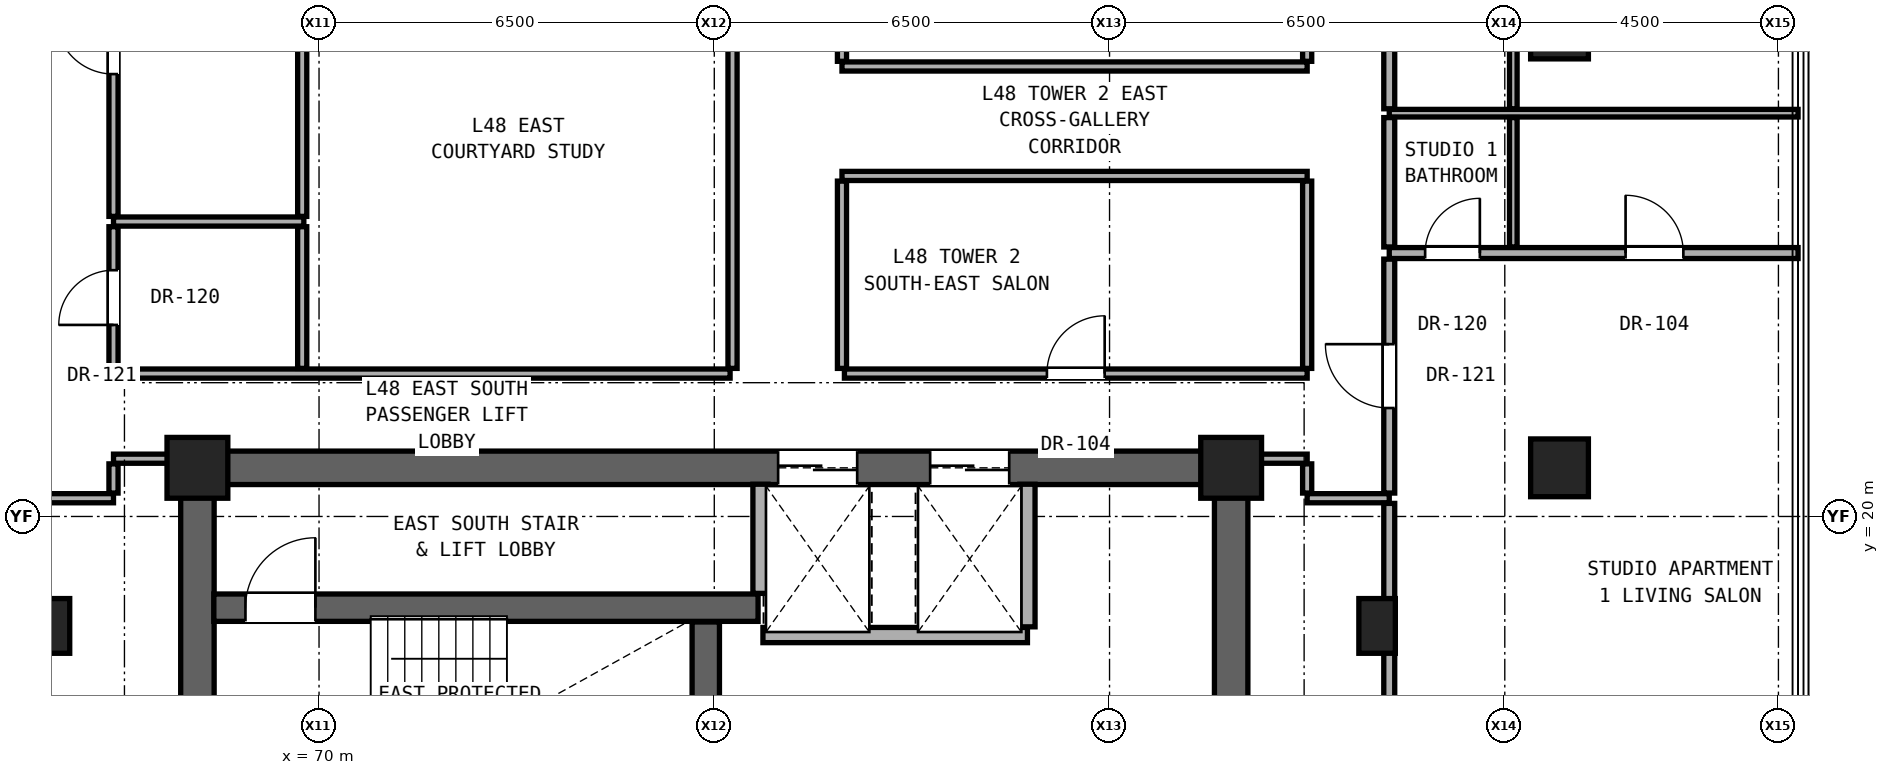
"""IFC4 building model, lengths in metres.
Left out: names, types, materials, properties, quantities, classifications, styles, units other than length and angle.
Written with IfcOpenShell. Run it as: python <this file> out.ifc"""

import sys

from ifc_helpers import new_model, si_unit, direction, frame, frame_2d, origin, origin_2d, place, context, subcontext, project, spatial, rectangle, hollow_rectangle, extrude, element, fill, save


model = new_model("IFC4")
c1 = context("Model", 3, precision=1e-05, world=origin(), true_north=direction((0.0, 1.0)))
c2 = subcontext(c1, "Body", "Model", "MODEL_VIEW")
j1 = project(units=[si_unit("LENGTHUNIT", "METRE"), si_unit("PLANEANGLEUNIT", "RADIAN")], contexts=[c1])
p1 = place(None, origin())
s1 = spatial("IfcSite", under=j1, at=p1, CompositionType="ELEMENT")
p2 = place(p1, origin())
s2 = spatial("IfcBuilding", under=s1, at=p2, CompositionType="ELEMENT")
p3 = place(p2, frame((0.0, 0.0, 170.65)))
s3 = spatial("IfcBuildingStorey", under=s2, at=p3, CompositionType="ELEMENT", Elevation=170.65)
for number, where, z_axis, x_axis in (
    (1, (68.0, 20.8, 0.0), (0.0, 0.0, 1.0), (1.0, 0.0, 0.0)),
    (2, (85.0, 20.8, 0.0), (0.0, 0.0, 1.0), (1.0, 0.0, 0.0)),
):
    element("IfcColumn", number, at=place(p3, frame(where, z_axis=z_axis, x_axis=x_axis)), inside=s3, PredefinedType="COLUMN", context=c2, shape_type="SweptSolid", body=[
        extrude(rectangle(XDim=1.0, YDim=1.0, at=origin_2d()), origin(), (0.0, 0.0, 1.0), 3.25),
    ])
for number, where, z_axis, x_axis in (
    (3, (90.4, 20.8, 0.0), (0.0, 0.0, 1.0), (1.0, 0.0, 0.0)),
    (4, (90.4, 28.0, 0.0), (0.0, 0.0, 1.0), (1.0, 0.0, 0.0)),
):
    element("IfcColumn", number, at=place(p3, frame(where, z_axis=z_axis, x_axis=x_axis)), inside=s3, PredefinedType="COLUMN", context=c2, shape_type="SweptSolid", body=[
        extrude(hollow_rectangle(XDim=0.95, YDim=0.95, WallThickness=0.05, at=origin_2d()), origin(), (0.0, 0.0, 1.0), 3.25),
    ])
for number, where, z_axis, x_axis in (
    (5, (65.6, 18.2, 0.0), (0.0, 0.0, 1.0), (1.0, 0.0, 0.0)),
    (6, (87.4, 18.2, 0.0), (0.0, 0.0, 1.0), (1.0, 0.0, 0.0)),
):
    element("IfcColumn", number, at=place(p3, frame(where, z_axis=z_axis, x_axis=x_axis)), inside=s3, PredefinedType="PILASTER", context=c2, shape_type="SweptSolid", body=[
        extrude(rectangle(XDim=0.6, YDim=0.9, at=origin_2d()), origin(), (0.0, 0.0, 1.0), 3.25),
    ])
for number, where, z_axis, x_axis in (
    (7, (68.0, 15.2, 0.0), (0.0, 0.0, 1.0), (0.0, 1.0, 0.0)),
    (8, (85.0, 15.2, 0.0), (0.0, 0.0, 1.0), (0.0, 1.0, 0.0)),
):
    element("IfcWall", number, at=place(p3, frame(where, z_axis=z_axis, x_axis=x_axis)), inside=s3, PredefinedType="SHEAR", context=c2, shape_type="SweptSolid", body=[
        extrude(rectangle(XDim=5.6, YDim=0.55, at=frame_2d((2.8, 0.0))), origin(), (0.0, 0.0, 1.0), 3.05),
    ])
p4 = place(p3, frame((68.0, 20.8, 0.0), z_axis=(0.0, 0.0, 1.0), x_axis=(1.0, 0.0, 0.0)))
e9 = element("IfcWall", 9, at=p4, inside=s3, PredefinedType="SHEAR", context=c2, shape_type="SweptSolid", body=[
    extrude(rectangle(XDim=17.0, YDim=0.55, at=frame_2d((8.5, 0.0))), origin(), (0.0, 0.0, 1.0), 3.05),
])
p5 = place(p4, frame((9.55, 0.0, 0.0)))
e10 = element("IfcOpeningElement", 10, at=p5, cuts=e9, PredefinedType="OPENING", context=c2, shape_type="SweptSolid", body=[
    extrude(rectangle(XDim=1.3, YDim=2.3, at=frame_2d((0.65, 1.15))), frame((0.0, 0.285, 0.0), z_axis=(0.0, -1.0, 0.0), x_axis=(1.0, 0.0, 0.0)), (0.0, 0.0, 1.0), 0.57),
])
p6 = place(p4, frame((12.05, 0.0, 0.0)))
e11 = element("IfcOpeningElement", 11, at=p6, cuts=e9, PredefinedType="OPENING", context=c2, shape_type="SweptSolid", body=[
    extrude(rectangle(XDim=1.3, YDim=2.3, at=frame_2d((0.65, 1.15))), frame((0.0, 0.285, 0.0), z_axis=(0.0, -1.0, 0.0), x_axis=(1.0, 0.0, 0.0)), (0.0, 0.0, 1.0), 0.57),
])
p7 = place(p3, frame((77.3, 18.05, 0.0), z_axis=(0.0, 0.0, 1.0), x_axis=(1.0, 0.0, 0.0)))
e12 = element("IfcWall", 12, at=p7, inside=s3, PredefinedType="SOLIDWALL", context=c2, shape_type="SweptSolid", body=[
    extrude(rectangle(XDim=4.35, YDim=0.25, at=frame_2d((2.175, 0.0))), origin(), (0.0, 0.0, 1.0), 3.05),
])
p8 = place(p3, frame((68.27, 18.5, 0.0), z_axis=(0.0, 0.0, 1.0), x_axis=(1.0, 0.0, 0.0)))
e13 = element("IfcWall", 13, at=p8, inside=s3, PredefinedType="SHEAR", context=c2, shape_type="SweptSolid", body=[
    extrude(rectangle(XDim=8.95, YDim=0.45, at=frame_2d((4.475, 0.0))), origin(), (0.0, 0.0, 1.0), 3.05),
])
p9 = place(p8, frame((0.52, 0.0, 0.0)))
e14 = element("IfcOpeningElement", 14, at=p9, cuts=e13, PredefinedType="OPENING", context=c2, shape_type="SweptSolid", body=[
    extrude(rectangle(XDim=1.15, YDim=2.2, at=frame_2d((0.575, 1.1))), frame((0.0, 0.235, 0.0), z_axis=(0.0, -1.0, 0.0), x_axis=(1.0, 0.0, 0.0)), (0.0, 0.0, 1.0), 0.47),
])
p10 = place(p3, frame((65.25, 20.3, 0.0), z_axis=(0.0, 0.0, 1.0), x_axis=(1.0, 0.0, 0.0)))
e15 = element("IfcWall", 15, at=p10, inside=s3, PredefinedType="PARTITIONING", context=c2, shape_type="SweptSolid", body=[
    extrude(rectangle(XDim=1.37, YDim=0.15, at=frame_2d((0.685, 0.0))), origin(), (0.0, 0.0, 1.0), 3.05),
])
p11 = place(p3, frame((86.25, 20.3, 0.0), z_axis=(0.0, 0.0, 1.0), x_axis=(1.0, 0.0, 0.0)))
e16 = element("IfcWall", 16, at=p11, inside=s3, PredefinedType="PARTITIONING", context=c2, shape_type="SweptSolid", body=[
    extrude(rectangle(XDim=1.35, YDim=0.15, at=frame_2d((0.675, 0.0))), origin(), (0.0, 0.0, 1.0), 3.05),
])
p12 = place(p3, frame((66.62, 20.95, 0.0), z_axis=(0.0, 0.0, 1.0), x_axis=(1.0, 0.0, 0.0)))
e17 = element("IfcWall", 17, at=p12, inside=s3, PredefinedType="PARTITIONING", context=c2, shape_type="SweptSolid", body=[
    extrude(rectangle(XDim=1.11, YDim=0.15, at=frame_2d((0.555, 0.0))), origin(), (0.0, 0.0, 1.0), 2.442),
])
p13 = place(p3, frame((85.27, 20.95, 0.0), z_axis=(0.0, 0.0, 1.0), x_axis=(1.0, 0.0, 0.0)))
e18 = element("IfcWall", 18, at=p13, inside=s3, PredefinedType="PARTITIONING", context=c2, shape_type="SweptSolid", body=[
    extrude(rectangle(XDim=0.98, YDim=0.15, at=frame_2d((0.49, 0.0))), origin(), (0.0, 0.0, 1.0), 2.442),
])
p14 = place(p3, frame((66.62, 22.35, 0.0), z_axis=(0.0, 0.0, 1.0), x_axis=(1.0, 0.0, 0.0)))
e19 = element("IfcWall", 19, at=p14, inside=s3, PredefinedType="PARTITIONING", context=c2, shape_type="SweptSolid", body=[
    extrude(rectangle(XDim=10.14, YDim=0.15, at=frame_2d((5.07, 0.0))), origin(), (0.0, 0.0, 1.0), 2.186),
])
p15 = place(p3, frame((78.64, 22.35, 0.0), z_axis=(0.0, 0.0, 1.0), x_axis=(1.0, 0.0, 0.0)))
e20 = element("IfcWall", 20, at=p15, inside=s3, PredefinedType="PARTITIONING", context=c2, shape_type="SweptSolid", body=[
    extrude(rectangle(XDim=7.61, YDim=0.15, at=frame_2d((3.805, 0.0))), origin(), (0.0, 0.0, 1.0), 2.186),
])
p16 = place(p15, frame((3.33, 0.0, 0.0)))
e21 = element("IfcOpeningElement", 21, at=p16, cuts=e20, PredefinedType="OPENING", context=c2, shape_type="SweptSolid", body=[
    extrude(rectangle(XDim=0.95, YDim=2.15, at=frame_2d((0.475, 1.075))), frame((0.0, 0.085, 0.0), z_axis=(0.0, -1.0, 0.0), x_axis=(1.0, 0.0, 0.0)), (0.0, 0.0, 1.0), 0.17),
])
p17 = place(p3, frame((87.6, 24.332, 0.0), z_axis=(0.0, 0.0, 1.0), x_axis=(1.0, 0.0, 0.0)))
e22 = element("IfcWall", 22, at=p17, inside=s3, PredefinedType="PARTITIONING", context=c2, shape_type="SweptSolid", body=[
    extrude(rectangle(XDim=6.723, YDim=0.18, at=frame_2d((3.361, 0.0))), origin(), (0.0, 0.0, 1.0), 2.269),
])
p18 = place(p17, frame((3.886, 0.0, 0.0)))
e23 = element("IfcOpeningElement", 23, at=p18, cuts=e22, PredefinedType="OPENING", context=c2, shape_type="SweptSolid", body=[
    extrude(rectangle(XDim=0.95, YDim=2.15, at=frame_2d((0.475, 1.075))), frame((0.0, 0.1, 0.0), z_axis=(0.0, -1.0, 0.0), x_axis=(1.0, 0.0, 0.0)), (0.0, 0.0, 1.0), 0.2),
])
p19 = place(p17, frame((0.59, 0.0, 0.0)))
e24 = element("IfcOpeningElement", 24, at=p19, cuts=e22, PredefinedType="OPENING", context=c2, shape_type="SweptSolid", body=[
    extrude(rectangle(XDim=0.9, YDim=2.1, at=frame_2d((0.45, 1.05))), frame((0.0, 0.1, 0.0), z_axis=(0.0, -1.0, 0.0), x_axis=(1.0, 0.0, 0.0)), (0.0, 0.0, 1.0), 0.2),
])
p20 = place(p3, frame((66.62, 24.85, 0.0), z_axis=(0.0, 0.0, 1.0), x_axis=(1.0, 0.0, 0.0)))
e25 = element("IfcWall", 25, at=p20, inside=s3, PredefinedType="PARTITIONING", context=c2, shape_type="SweptSolid", body=[
    extrude(rectangle(XDim=3.13, YDim=0.15, at=frame_2d((1.565, 0.0))), origin(), (0.0, 0.0, 1.0), 2.186),
])
p21 = place(p3, frame((78.6, 25.6, 0.0), z_axis=(0.0, 0.0, 1.0), x_axis=(1.0, 0.0, 0.0)))
e26 = element("IfcWall", 26, at=p21, inside=s3, PredefinedType="PARTITIONING", context=c2, shape_type="SweptSolid", body=[
    extrude(rectangle(XDim=7.65, YDim=0.15, at=frame_2d((3.825, 0.0))), origin(), (0.0, 0.0, 1.0), 2.186),
])
p22 = place(p3, frame((87.6, 26.632, 0.0), z_axis=(0.0, 0.0, 1.0), x_axis=(1.0, 0.0, 0.0)))
e27 = element("IfcWall", 27, at=p22, inside=s3, PredefinedType="PARTITIONING", context=c2, shape_type="SweptSolid", body=[
    extrude(rectangle(XDim=6.723, YDim=0.125, at=frame_2d((3.361, 0.0))), origin(), (0.0, 0.0, 1.0), 2.269),
])
p23 = place(p3, frame((78.6, 27.4, 0.0), z_axis=(0.0, 0.0, 1.0), x_axis=(1.0, 0.0, 0.0)))
e28 = element("IfcWall", 28, at=p23, inside=s3, PredefinedType="PARTITIONING", context=c2, shape_type="SweptSolid", body=[
    extrude(rectangle(XDim=7.65, YDim=0.15, at=frame_2d((3.825, 0.0))), origin(), (0.0, 0.0, 1.0), 2.186),
])
p24 = place(p3, frame((66.62, 20.385, 0.0), z_axis=(0.0, 0.0, 1.0), x_axis=(0.0, 1.0, 0.0)))
e29 = element("IfcWall", 29, at=p24, inside=s3, PredefinedType="PARTITIONING", context=c2, shape_type="SweptSolid", body=[
    extrude(rectangle(XDim=0.48, YDim=0.15, at=frame_2d((0.24, 0.0))), origin(), (0.0, 0.0, 1.0), 2.442),
])
p25 = place(p3, frame((66.62, 22.435, 0.0), z_axis=(0.0, 0.0, 1.0), x_axis=(0.0, 1.0, 0.0)))
e30 = element("IfcWall", 30, at=p25, inside=s3, PredefinedType="PARTITIONING", context=c2, shape_type="SweptSolid", body=[
    extrude(rectangle(XDim=2.33, YDim=0.15, at=frame_2d((1.165, 0.0))), origin(), (0.0, 0.0, 1.0), 3.05),
])
p26 = place(p25, frame((0.715, 0.0, 0.0)))
e31 = element("IfcOpeningElement", 31, at=p26, cuts=e30, PredefinedType="OPENING", context=c2, shape_type="SweptSolid", body=[
    extrude(rectangle(XDim=0.9, YDim=2.1, at=frame_2d((0.45, 1.05))), frame((0.0, 0.085, 0.0), z_axis=(0.0, -1.0, 0.0), x_axis=(1.0, 0.0, 0.0)), (0.0, 0.0, 1.0), 0.17),
])
p27 = place(p3, frame((66.62, 24.935, 0.0), z_axis=(0.0, 0.0, 1.0), x_axis=(0.0, 1.0, 0.0)))
e32 = element("IfcWall", 32, at=p27, inside=s3, PredefinedType="PARTITIONING", context=c2, shape_type="SweptSolid", body=[
    extrude(rectangle(XDim=5.63, YDim=0.15, at=frame_2d((2.815, 0.0))), origin(), (0.0, 0.0, 1.0), 2.346),
])
p28 = place(p27, frame((2.34, 0.0, 0.0)))
e33 = element("IfcOpeningElement", 33, at=p28, cuts=e32, PredefinedType="OPENING", context=c2, shape_type="SweptSolid", body=[
    extrude(rectangle(XDim=0.95, YDim=2.15, at=frame_2d((0.475, 1.075))), frame((0.0, 0.085, 0.0), z_axis=(0.0, -1.0, 0.0), x_axis=(1.0, 0.0, 0.0)), (0.0, 0.0, 1.0), 0.17),
])
p29 = place(p3, frame((69.723, 22.435, 0.0), z_axis=(0.0, 0.0, 1.0), x_axis=(0.0, 1.0, 0.0)))
e34 = element("IfcWall", 34, at=p29, inside=s3, PredefinedType="PARTITIONING", context=c2, shape_type="SweptSolid", body=[
    extrude(rectangle(XDim=2.33, YDim=0.15, at=frame_2d((1.165, 0.0))), origin(), (0.0, 0.0, 1.0), 3.05),
])
p30 = place(p3, frame((69.723, 24.935, 0.0), z_axis=(0.0, 0.0, 1.0), x_axis=(0.0, 1.0, 0.0)))
e35 = element("IfcWall", 35, at=p30, inside=s3, PredefinedType="PARTITIONING", context=c2, shape_type="SweptSolid", body=[
    extrude(rectangle(XDim=5.63, YDim=0.15, at=frame_2d((2.815, 0.0))), origin(), (0.0, 0.0, 1.0), 2.186),
])
p31 = place(p3, frame((76.36, 15.715, 0.0), z_axis=(0.0, 0.0, 1.0), x_axis=(0.0, 1.0, 0.0)))
e36 = element("IfcWall", 36, at=p31, inside=s3, PredefinedType="SHEAR", context=c2, shape_type="SweptSolid", body=[
    extrude(rectangle(XDim=2.55, YDim=0.45, at=frame_2d((1.275, 0.0))), origin(), (0.0, 0.0, 1.0), 3.05),
])
p32 = place(p3, frame((76.8, 22.435, 0.0), z_axis=(0.0, 0.0, 1.0), x_axis=(0.0, 1.0, 0.0)))
e37 = element("IfcWall", 37, at=p32, inside=s3, PredefinedType="PARTITIONING", context=c2, shape_type="SweptSolid", body=[
    extrude(rectangle(XDim=8.13, YDim=0.15, at=frame_2d((4.065, 0.0))), origin(), (0.0, 0.0, 1.0), 2.186),
])
p33 = place(p3, frame((77.26, 18.735, 0.0), z_axis=(0.0, 0.0, 1.0), x_axis=(0.0, 1.0, 0.0)))
e38 = element("IfcWall", 38, at=p33, inside=s3, PredefinedType="SOLIDWALL", context=c2, shape_type="SweptSolid", body=[
    extrude(rectangle(XDim=1.795, YDim=0.25, at=frame_2d((0.897, 0.0))), origin(), (0.0, 0.0, 1.0), 3.05),
])
p34 = place(p3, frame((78.6, 22.435, 0.0), z_axis=(0.0, 0.0, 1.0), x_axis=(0.0, 1.0, 0.0)))
e39 = element("IfcWall", 39, at=p34, inside=s3, PredefinedType="PARTITIONING", context=c2, shape_type="SweptSolid", body=[
    extrude(rectangle(XDim=3.08, YDim=0.15, at=frame_2d((1.54, 0.0))), origin(), (0.0, 0.0, 1.0), 3.05),
])
p35 = place(p3, frame((78.6, 27.485, 0.0), z_axis=(0.0, 0.0, 1.0), x_axis=(0.0, 1.0, 0.0)))
e40 = element("IfcWall", 40, at=p35, inside=s3, PredefinedType="PARTITIONING", context=c2, shape_type="SweptSolid", body=[
    extrude(rectangle(XDim=3.08, YDim=0.15, at=frame_2d((1.54, 0.0))), origin(), (0.0, 0.0, 1.0), 2.186),
])
p36 = place(p3, frame((81.65, 18.185, 0.0), z_axis=(0.0, 0.0, 1.0), x_axis=(0.0, 1.0, 0.0)))
e41 = element("IfcWall", 41, at=p36, inside=s3, PredefinedType="SOLIDWALL", context=c2, shape_type="SweptSolid", body=[
    extrude(rectangle(XDim=2.345, YDim=0.25, at=frame_2d((1.172, 0.0))), origin(), (0.0, 0.0, 1.0), 3.05),
])
p37 = place(p3, frame((86.25, 20.385, 0.0), z_axis=(0.0, 0.0, 1.0), x_axis=(0.0, 1.0, 0.0)))
e42 = element("IfcWall", 42, at=p37, inside=s3, PredefinedType="PARTITIONING", context=c2, shape_type="SweptSolid", body=[
    extrude(rectangle(XDim=0.48, YDim=0.15, at=frame_2d((0.24, 0.0))), origin(), (0.0, 0.0, 1.0), 2.442),
])
p38 = place(p3, frame((86.25, 22.435, 0.0), z_axis=(0.0, 0.0, 1.0), x_axis=(0.0, 1.0, 0.0)))
e43 = element("IfcWall", 43, at=p38, inside=s3, PredefinedType="PARTITIONING", context=c2, shape_type="SweptSolid", body=[
    extrude(rectangle(XDim=3.08, YDim=0.15, at=frame_2d((1.54, 0.0))), origin(), (0.0, 0.0, 1.0), 3.05),
])
p39 = place(p3, frame((86.25, 27.485, 0.0), z_axis=(0.0, 0.0, 1.0), x_axis=(0.0, 1.0, 0.0)))
e44 = element("IfcWall", 44, at=p39, inside=s3, PredefinedType="PARTITIONING", context=c2, shape_type="SweptSolid", body=[
    extrude(rectangle(XDim=3.08, YDim=0.15, at=frame_2d((1.54, 0.0))), origin(), (0.0, 0.0, 1.0), 2.346),
])
p40 = place(p3, frame((87.6, 16.857, 0.0), z_axis=(0.0, 0.0, 1.0), x_axis=(0.0, 1.0, 0.0)))
e45 = element("IfcWall", 45, at=p40, inside=s3, PredefinedType="PARTITIONING", context=c2, shape_type="SweptSolid", body=[
    extrude(rectangle(XDim=3.358, YDim=0.18, at=frame_2d((1.679, 0.0))), origin(), (0.0, 0.0, 1.0), 2.493),
])
p41 = place(p3, frame((87.6, 20.385, 0.0), z_axis=(0.0, 0.0, 1.0), x_axis=(0.0, 1.0, 0.0)))
e46 = element("IfcWall", 46, at=p41, inside=s3, PredefinedType="PARTITIONING", context=c2, shape_type="SweptSolid", body=[
    extrude(rectangle(XDim=3.847, YDim=0.18, at=frame_2d((1.923, 0.0))), origin(), (0.0, 0.0, 1.0), 2.442),
])
p42 = place(p41, frame((1.398, 0.0, 0.0)))
e47 = element("IfcOpeningElement", 47, at=p42, cuts=e46, PredefinedType="OPENING", context=c2, shape_type="SweptSolid", body=[
    extrude(rectangle(XDim=1.05, YDim=2.2, at=frame_2d((0.525, 1.1))), frame((0.0, 0.1, 0.0), z_axis=(0.0, -1.0, 0.0), x_axis=(1.0, 0.0, 0.0)), (0.0, 0.0, 1.0), 0.2),
])
p43 = place(p3, frame((87.6, 24.432, 0.0), z_axis=(0.0, 0.0, 1.0), x_axis=(0.0, 1.0, 0.0)))
e48 = element("IfcWall", 48, at=p43, inside=s3, PredefinedType="PARTITIONING", context=c2, shape_type="SweptSolid", body=[
    extrude(rectangle(XDim=2.128, YDim=0.18, at=frame_2d((1.064, 0.0))), origin(), (0.0, 0.0, 1.0), 3.05),
])
p44 = place(p3, frame((87.6, 26.705, 0.0), z_axis=(0.0, 0.0, 1.0), x_axis=(0.0, 1.0, 0.0)))
e49 = element("IfcWall", 49, at=p44, inside=s3, PredefinedType="PARTITIONING", context=c2, shape_type="SweptSolid", body=[
    extrude(rectangle(XDim=2.562, YDim=0.18, at=frame_2d((1.281, 0.0))), origin(), (0.0, 0.0, 1.0), 2.346),
])
p45 = place(p3, frame((89.64, 24.432, 0.0), z_axis=(0.0, 0.0, 1.0), x_axis=(0.0, 1.0, 0.0)))
e50 = element("IfcWall", 50, at=p45, inside=s3, PredefinedType="PARTITIONING", context=c2, shape_type="SweptSolid", body=[
    extrude(rectangle(XDim=2.128, YDim=0.125, at=frame_2d((1.064, 0.0))), origin(), (0.0, 0.0, 1.0), 3.05),
])
p46 = place(p3, frame((89.64, 26.705, 0.0), z_axis=(0.0, 0.0, 1.0), x_axis=(0.0, 1.0, 0.0)))
e51 = element("IfcWall", 51, at=p46, inside=s3, PredefinedType="PARTITIONING", context=c2, shape_type="SweptSolid", body=[
    extrude(rectangle(XDim=2.562, YDim=0.125, at=frame_2d((1.281, 0.0))), origin(), (0.0, 0.0, 1.0), 2.346),
])
p47 = place(p9, origin())
e52 = element("IfcDoor", 52, at=p47, inside=s3, OperationType="SINGLE_SWING_RIGHT", PredefinedType="DOOR", context=c2, shape_type="SweptSolid", body=[
    extrude(rectangle(XDim=1.15, YDim=2.2, at=frame_2d((0.575, 1.1))), frame((0.0, 0.025, 0.0), z_axis=(0.0, -1.0, 0.0), x_axis=(1.0, 0.0, 0.0)), (0.0, 0.0, 1.0), 0.05),
])
fill(e14, e52)
p48 = place(p26, origin())
e53 = element("IfcDoor", 53, at=p48, inside=s3, OperationType="SINGLE_SWING_LEFT", PredefinedType="DOOR", context=c2, shape_type="SweptSolid", body=[
    extrude(rectangle(XDim=0.9, YDim=2.1, at=frame_2d((0.45, 1.05))), frame((0.0, 0.025, 0.0), z_axis=(0.0, -1.0, 0.0), x_axis=(1.0, 0.0, 0.0)), (0.0, 0.0, 1.0), 0.05),
])
fill(e31, e53)
p49 = place(p42, origin())
e54 = element("IfcDoor", 54, at=p49, inside=s3, OperationType="SINGLE_SWING_RIGHT", PredefinedType="DOOR", context=c2, shape_type="SweptSolid", body=[
    extrude(rectangle(XDim=1.05, YDim=2.2, at=frame_2d((0.525, 1.1))), frame((0.0, 0.025, 0.0), z_axis=(0.0, -1.0, 0.0), x_axis=(1.0, 0.0, 0.0)), (0.0, 0.0, 1.0), 0.05),
])
fill(e47, e54)
p50 = place(p18, origin())
e55 = element("IfcDoor", 55, at=p50, inside=s3, OperationType="SINGLE_SWING_LEFT", PredefinedType="DOOR", context=c2, shape_type="SweptSolid", body=[
    extrude(rectangle(XDim=0.95, YDim=2.15, at=frame_2d((0.475, 1.075))), frame((0.0, 0.025, 0.0), z_axis=(0.0, -1.0, 0.0), x_axis=(1.0, 0.0, 0.0)), (0.0, 0.0, 1.0), 0.05),
])
fill(e23, e55)
p51 = place(p19, origin())
e56 = element("IfcDoor", 56, at=p51, inside=s3, OperationType="SINGLE_SWING_RIGHT", PredefinedType="DOOR", context=c2, shape_type="SweptSolid", body=[
    extrude(rectangle(XDim=0.9, YDim=2.1, at=frame_2d((0.45, 1.05))), frame((0.0, 0.025, 0.0), z_axis=(0.0, -1.0, 0.0), x_axis=(1.0, 0.0, 0.0)), (0.0, 0.0, 1.0), 0.05),
])
fill(e24, e56)
p52 = place(p28, origin())
e57 = element("IfcDoor", 57, at=p52, inside=s3, OperationType="SINGLE_SWING_RIGHT", PredefinedType="DOOR", context=c2, shape_type="SweptSolid", body=[
    extrude(rectangle(XDim=0.95, YDim=2.15, at=frame_2d((0.475, 1.075))), frame((0.0, 0.025, 0.0), z_axis=(0.0, -1.0, 0.0), x_axis=(1.0, 0.0, 0.0)), (0.0, 0.0, 1.0), 0.05),
])
fill(e33, e57)
p53 = place(p16, origin())
e58 = element("IfcDoor", 58, at=p53, inside=s3, OperationType="SINGLE_SWING_RIGHT", PredefinedType="DOOR", context=c2, shape_type="SweptSolid", body=[
    extrude(rectangle(XDim=0.95, YDim=2.15, at=frame_2d((0.475, 1.075))), frame((0.0, 0.025, 0.0), z_axis=(0.0, -1.0, 0.0), x_axis=(1.0, 0.0, 0.0)), (0.0, 0.0, 1.0), 0.05),
])
fill(e21, e58)
p54 = place(p5, origin())
e59 = element("IfcDoor", 59, at=p54, inside=s3, OperationType="DOUBLE_DOOR_SLIDING", PredefinedType="DOOR", context=c2, shape_type="SweptSolid", body=[
    extrude(rectangle(XDim=1.3, YDim=2.3, at=frame_2d((0.65, 1.15))), frame((0.0, 0.025, 0.0), z_axis=(0.0, -1.0, 0.0), x_axis=(1.0, 0.0, 0.0)), (0.0, 0.0, 1.0), 0.05),
])
fill(e10, e59)
p55 = place(p6, origin())
e60 = element("IfcDoor", 60, at=p55, inside=s3, OperationType="DOUBLE_DOOR_SLIDING", PredefinedType="DOOR", context=c2, shape_type="SweptSolid", body=[
    extrude(rectangle(XDim=1.3, YDim=2.3, at=frame_2d((0.65, 1.15))), frame((0.0, 0.025, 0.0), z_axis=(0.0, -1.0, 0.0), x_axis=(1.0, 0.0, 0.0)), (0.0, 0.0, 1.0), 0.05),
])
fill(e11, e60)
save(model, sys.argv[1])
